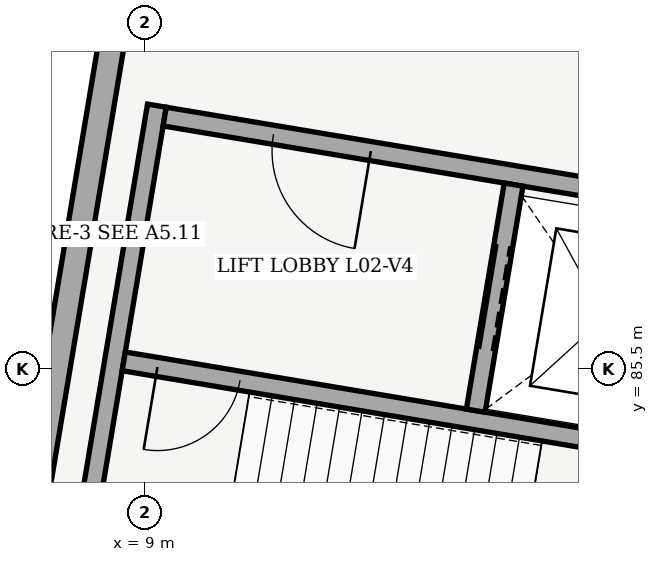
"""IFC4 building model, lengths in metres.
Left out: names, types, materials, properties, quantities, classifications, styles, units other than length and angle.
Written with IfcOpenShell. Run it as: python <this file> out.ifc"""

import sys

from ifc_helpers import new_model, si_unit, direction, frame, frame_2d, origin, origin_with_axes, place, context, subcontext, project, spatial, rectangle, extrude, element, fill, save


model = new_model("IFC4")
c1 = context("Model", 3, precision=1e-05, world=origin(), true_north=direction((0.0, 1.0)))
c2 = subcontext(c1, "Body", "Model", "MODEL_VIEW")
j1 = project(units=[si_unit("LENGTHUNIT", "METRE"), si_unit("PLANEANGLEUNIT", "RADIAN")], contexts=[c1])
p1 = place(None, origin())
s1 = spatial("IfcSite", under=j1, at=p1, CompositionType="ELEMENT")
p2 = place(p1, origin())
s2 = spatial("IfcBuilding", under=s1, at=p2, CompositionType="ELEMENT")
p3 = place(p2, frame((0.0, 0.0, 9.6)))
s3 = spatial("IfcBuildingStorey", under=s2, at=p3, CompositionType="ELEMENT", Elevation=9.6)
p4 = place(p3, frame((7.095, 81.031, 0.0), z_axis=(0.0, 0.0, 1.0), x_axis=(0.165042037753, 0.986286533303, 0.0)))
e1 = element("IfcWall", 1, at=p4, inside=s3, PredefinedType="SOLIDWALL", context=c2, shape_type="SweptSolid", body=[
    extrude(rectangle(XDim=9.173, YDim=0.34, at=frame_2d((4.586, 0.0))), origin(), (0.0, 0.0, 1.0), 3.4),
])
p5 = place(p3, frame((7.856, 81.184, 0.0), z_axis=(0.0, 0.0, 1.0), x_axis=(0.165031598329, 0.986288280146, 0.0)))
e2 = element("IfcWall", 2, at=p5, inside=s3, PredefinedType="SHEAR", context=c2, shape_type="SweptSolid", body=[
    extrude(rectangle(XDim=7.885, YDim=0.25, at=frame_2d((3.942, 0.0))), origin(), (0.0, 0.0, 1.0), 4.54),
])
p6 = place(p3, frame((16.167, 84.351, 0.0), z_axis=(0.0, 0.0, 1.0), x_axis=(-0.986286216974, 0.165043928115, 0.0)))
e3 = element("IfcWall", 3, at=p6, inside=s3, PredefinedType="SHEAR", context=c2, shape_type="SweptSolid", body=[
    extrude(rectangle(XDim=7.55, YDim=0.25, at=frame_2d((3.775, 0.0))), origin(), (0.0, 0.0, 1.0), 4.54),
])
p7 = place(p6, frame((6.0, 0.0, 0.0)))
e4 = element("IfcOpeningElement", 4, at=p7, cuts=e3, PredefinedType="OPENING", context=c2, shape_type="SweptSolid", body=[
    extrude(rectangle(XDim=1.1, YDim=2.15, at=frame_2d((0.55, 1.075))), frame((0.0, 0.135, 0.0), z_axis=(0.0, -1.0, 0.0), x_axis=(1.0, 0.0, 0.0)), (0.0, 0.0, 1.0), 0.27),
])
p8 = place(p3, frame((16.706, 87.571, 0.0), z_axis=(0.0, 0.0, 1.0), x_axis=(-0.98628533611, 0.165049191984, 0.0)))
e5 = element("IfcWall", 5, at=p8, inside=s3, PredefinedType="SHEAR", context=c2, shape_type="SweptSolid", body=[
    extrude(rectangle(XDim=7.55, YDim=0.25, at=frame_2d((3.775, 0.0))), origin(), (0.0, 0.0, 1.0), 4.54),
])
p9 = place(p8, frame((4.8, 0.0, 0.0)))
e6 = element("IfcOpeningElement", 6, at=p9, cuts=e5, PredefinedType="OPENING", context=c2, shape_type="SweptSolid", body=[
    extrude(rectangle(XDim=1.3, YDim=2.15, at=frame_2d((0.65, 1.075))), frame((0.0, 0.135, 0.0), z_axis=(0.0, -1.0, 0.0), x_axis=(1.0, 0.0, 0.0)), (0.0, 0.0, 1.0), 0.27),
])
p10 = place(p3, frame((13.352, 84.948, 0.0), z_axis=(0.0, 0.0, 1.0), x_axis=(0.165029254052, 0.986288672401, 0.0)))
e7 = element("IfcWall", 7, at=p10, inside=s3, PredefinedType="SHEAR", context=c2, shape_type="SweptSolid", body=[
    extrude(rectangle(XDim=3.015, YDim=0.25, at=frame_2d((1.507, 0.0))), origin(), (0.0, 0.0, 1.0), 4.54),
])
p11 = place(p10, frame((0.808, 0.0, 0.0)))
e8 = element("IfcOpeningElement", 8, at=p11, cuts=e7, PredefinedType="OPENING", context=c2, shape_type="SweptSolid", body=[
    extrude(rectangle(XDim=1.4, YDim=2.15, at=frame_2d((0.7, 1.075))), frame((0.0, 0.135, 0.0), z_axis=(0.0, -1.0, 0.0), x_axis=(1.0, 0.0, 0.0)), (0.0, 0.0, 1.0), 0.27),
])
p12 = place(p3, frame((53.115, 84.418, 0.0), z_axis=(0.0, 0.0, 1.0), x_axis=(-0.986286301143, 0.165043425126, 0.0)))
e9 = element("IfcWall", 9, at=p12, inside=s3, PredefinedType="PARTITIONING", context=c2, shape_type="SweptSolid", body=[
    extrude(rectangle(XDim=44.66, YDim=0.2, at=frame_2d((22.33, 0.0))), origin(), (0.0, 0.0, 1.0), 3.38),
])
p13 = place(p12, frame((21.63, 0.0, 0.0)))
e10 = element("IfcOpeningElement", 10, at=p13, cuts=e9, PredefinedType="OPENING", context=c2, shape_type="SweptSolid", body=[
    extrude(rectangle(XDim=1.4, YDim=2.2, at=frame_2d((0.7, 1.1))), frame((0.0, 0.11, 0.0), z_axis=(0.0, -1.0, 0.0), x_axis=(1.0, 0.0, 0.0)), (0.0, 0.0, 1.0), 0.22),
])
p14 = place(p7, origin_with_axes())
e11 = element("IfcDoor", 11, at=p14, inside=s3, OperationType="SINGLE_SWING_RIGHT", PredefinedType="DOOR", context=c2, shape_type="SweptSolid", body=[
    extrude(rectangle(XDim=1.1, YDim=2.15, at=frame_2d((0.55, 1.075))), frame((0.0, 0.025, 0.0), z_axis=(0.0, -1.0, 0.0), x_axis=(1.0, 0.0, 0.0)), (0.0, 0.0, 1.0), 0.05),
])
fill(e4, e11)
p15 = place(p9, origin_with_axes())
e12 = element("IfcDoor", 12, at=p15, inside=s3, OperationType="SINGLE_SWING_LEFT", PredefinedType="DOOR", context=c2, shape_type="SweptSolid", body=[
    extrude(rectangle(XDim=1.3, YDim=2.15, at=frame_2d((0.65, 1.075))), frame((0.0, 0.025, 0.0), z_axis=(0.0, -1.0, 0.0), x_axis=(1.0, 0.0, 0.0)), (0.0, 0.0, 1.0), 0.05),
])
fill(e6, e12)
p16 = place(p11, origin_with_axes())
e13 = element("IfcDoor", 13, at=p16, inside=s3, OperationType="DOUBLE_DOOR_SLIDING", PredefinedType="DOOR", context=c2, shape_type="SweptSolid", body=[
    extrude(rectangle(XDim=1.4, YDim=2.15, at=frame_2d((0.7, 1.075))), frame((0.0, 0.025, 0.0), z_axis=(0.0, -1.0, 0.0), x_axis=(1.0, 0.0, 0.0)), (0.0, 0.0, 1.0), 0.05),
])
fill(e8, e13)
save(model, sys.argv[1])
